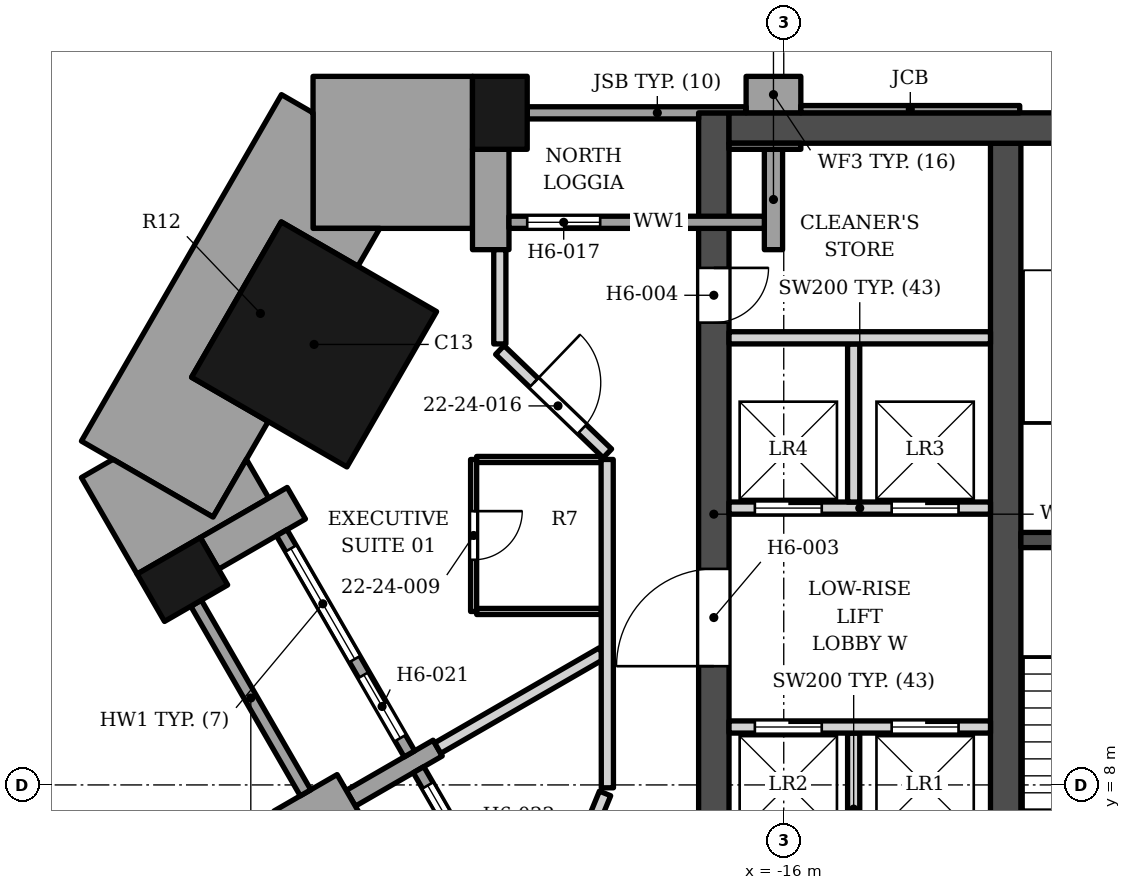
"""IFC4 building model, lengths in metres.
Left out: names, types, materials, properties, quantities, classifications, styles, units other than length and angle.
Written with IfcOpenShell. Run it as: python <this file> out.ifc"""

import sys

from ifc_helpers import new_model, si_unit, direction, frame, frame_2d, origin, origin_2d, place, context, subcontext, project, spatial, polyline, rectangle, outline, extrude, element, fill, save


model = new_model("IFC4")
c1 = context("Model", 3, precision=1e-05, world=origin(), true_north=direction((0.0, 1.0)))
c2 = subcontext(c1, "Body", "Model", "MODEL_VIEW")
j1 = project(units=[si_unit("LENGTHUNIT", "METRE"), si_unit("PLANEANGLEUNIT", "RADIAN")], contexts=[c1])
p1 = place(None, origin())
s1 = spatial("IfcSite", under=j1, at=p1, CompositionType="ELEMENT")
p2 = place(p1, origin())
s2 = spatial("IfcBuilding", under=s1, at=p2, CompositionType="ELEMENT")
p3 = place(p2, frame((0.0, 0.0, 102.0)))
s3 = spatial("IfcBuildingStorey", under=s2, at=p3, CompositionType="ELEMENT", Elevation=102.0)
p4 = place(p3, frame((-16.9, 18.802, 0.0), z_axis=(0.0, 0.0, 1.0), x_axis=(1.0, 0.0, 0.0)))
e1 = element("IfcWall", 1, at=p4, inside=s3, PredefinedType="SHEAR", context=c2, shape_type="SweptSolid", body=[
    extrude(rectangle(XDim=33.8, YDim=0.5, at=frame_2d((16.9, 0.0))), origin(), (0.0, 0.0, 1.0), 3.4),
])
p5 = place(p3, frame((-12.35, 5.253, 0.0), z_axis=(0.0, 0.0, 1.0), x_axis=(0.0, 1.0, 0.0)))
e2 = element("IfcWall", 2, at=p5, inside=s3, PredefinedType="SHEAR", context=c2, shape_type="SweptSolid", body=[
    extrude(rectangle(XDim=13.3, YDim=0.5, at=frame_2d((6.65, 0.0))), origin(), (0.0, 0.0, 1.0), 3.4),
])
p6 = place(p3, frame((-12.1, 12.028, 0.0), z_axis=(0.0, 0.0, 1.0), x_axis=(1.0, 0.0, 0.0)))
e3 = element("IfcWall", 3, at=p6, inside=s3, PredefinedType="SHEAR", context=c2, shape_type="SweptSolid", body=[
    extrude(rectangle(XDim=3.75, YDim=0.25, at=frame_2d((1.875, 0.0))), origin(), (0.0, 0.0, 1.0), 3.4),
])
p7 = place(p3, frame((-17.15, 5.853, 0.0), z_axis=(0.0, 0.0, 1.0), x_axis=(0.0, 1.0, 0.0)))
e4 = element("IfcWall", 4, at=p7, inside=s3, PredefinedType="SHEAR", context=c2, shape_type="SweptSolid", body=[
    extrude(rectangle(XDim=13.2, YDim=0.5, at=frame_2d((6.6, 0.0))), origin(), (0.0, 0.0, 1.0), 3.4),
])
p8 = place(p7, frame((4.1, 0.0, 0.0)))
e5 = element("IfcOpeningElement", 5, at=p8, cuts=e4, PredefinedType="OPENING", context=c2, shape_type="SweptSolid", body=[
    extrude(rectangle(XDim=1.6, YDim=2.1, at=frame_2d((0.8, 1.05))), frame((0.0, 0.26, 0.0), z_axis=(0.0, -1.0, 0.0), x_axis=(1.0, 0.0, 0.0)), (0.0, 0.0, 1.0), 0.52),
])
p9 = place(p7, frame((9.75, 0.0, 0.0)))
e6 = element("IfcOpeningElement", 6, at=p9, cuts=e4, PredefinedType="OPENING", context=c2, shape_type="SweptSolid", body=[
    extrude(rectangle(XDim=0.9, YDim=2.1, at=frame_2d((0.45, 1.05))), frame((0.0, 0.26, 0.0), z_axis=(0.0, -1.0, 0.0), x_axis=(1.0, 0.0, 0.0)), (0.0, 0.0, 1.0), 0.52),
])
p10 = place(p3, frame((-23.724, 15.244, 0.0), z_axis=(0.0, 0.0, 1.0), x_axis=(0.866025403784, -0.5, 0.0)))
e7 = element("IfcColumn", 7, at=p10, inside=s3, PredefinedType="COLUMN", context=c2, shape_type="SweptSolid", body=[
    extrude(rectangle(XDim=2.95, YDim=2.95, at=origin_2d()), origin(), (0.0, 0.0, 1.0), 3.4),
])
for number, where, z_axis, x_axis in (
    (8, (-25.89, 11.378, 0.0), (0.0, 0.0, 1.0), (0.5, -0.866, 0.0)),
    (9, (-20.669, 19.053, 0.0), (0.0, 0.0, 1.0), (-1.0, 0.0, 0.0)),
):
    element("IfcColumn", number, at=place(p3, frame(where, z_axis=z_axis, x_axis=x_axis)), inside=s3, PredefinedType="COLUMN", context=c2, shape_type="SweptSolid", body=[
        extrude(rectangle(XDim=0.9, YDim=1.2, at=origin_2d()), origin(), (0.0, 0.0, 1.0), 3.4),
    ])
p11 = place(p3, frame((-25.445, 11.808, 0.0), z_axis=(0.0, 0.0, 1.0), x_axis=(0.866040211805, 0.499974350878, 0.0)))
e10 = element("IfcWall", 10, at=p11, inside=s3, PredefinedType="SOLIDWALL", context=c2, shape_type="SweptSolid", body=[
    extrude(rectangle(XDim=1.65, YDim=0.6, at=frame_2d((0.825, 0.0))), origin(), (0.0, 0.0, 1.0), 2.63),
])
p12 = place(p3, frame((-24.159, 7.181, 0.0), z_axis=(0.0, 0.0, 1.0), x_axis=(0.866043267704, 0.499969057507, 0.0)))
e11 = element("IfcWall", 11, at=p12, inside=s3, PredefinedType="SOLIDWALL", context=c2, shape_type="SweptSolid", body=[
    extrude(rectangle(XDim=1.2, YDim=0.9, at=frame_2d((0.6, 0.0))), origin(), (0.0, 0.0, 1.0), 2.63),
])
p13 = place(p3, frame((-23.12, 7.781, 0.0), z_axis=(0.0, 0.0, 1.0), x_axis=(0.865976140824, 0.500085316245, 0.0)))
e12 = element("IfcWall", 12, at=p13, inside=s3, PredefinedType="SOLIDWALL", context=c2, shape_type="SweptSolid", body=[
    extrude(rectangle(XDim=1.65, YDim=0.3, at=frame_2d((0.825, 0.0))), origin(), (0.0, 0.0, 1.0), 2.65),
])
p14 = place(p3, frame((-25.665, 10.988, 0.0), z_axis=(0.0, 0.0, 1.0), x_axis=(0.499961193289, -0.866047807691, 0.0)))
e13 = element("IfcWall", 13, at=p14, inside=s3, PredefinedType="SOLIDWALL", context=c2, shape_type="SweptSolid", body=[
    extrude(rectangle(XDim=3.6, YDim=0.2, at=frame_2d((1.8, 0.0))), origin(), (0.0, 0.0, 1.0), 2.63),
])
p15 = place(p3, frame((-24.256, 12.148, 0.0), z_axis=(0.0, 0.0, 1.0), x_axis=(0.500027713859, -0.866009402589, 0.0)))
e14 = element("IfcWall", 14, at=p15, inside=s3, PredefinedType="ELEMENTEDWALL", context=c2, shape_type="SweptSolid", body=[
    extrude(rectangle(XDim=4.2, YDim=0.2, at=frame_2d((2.1, 0.0))), origin(), (0.0, 0.0, 1.0), 2.65),
])
p16 = place(p15, frame((0.3, 0.0, 0.6)))
e15 = element("IfcOpeningElement", 15, at=p16, cuts=e14, PredefinedType="OPENING", context=c2, shape_type="SweptSolid", body=[
    extrude(rectangle(XDim=2.1, YDim=1.8, at=frame_2d((1.05, 0.9))), frame((0.0, 0.11, 0.0), z_axis=(0.0, -1.0, 0.0), x_axis=(1.0, 0.0, 0.0)), (0.0, 0.0, 1.0), 0.22),
])
p17 = place(p15, frame((2.7, 0.0, 0.0)))
e16 = element("IfcOpeningElement", 16, at=p17, cuts=e14, PredefinedType="OPENING", context=c2, shape_type="SweptSolid", body=[
    extrude(rectangle(XDim=1.2, YDim=2.4, at=frame_2d((0.6, 1.2))), frame((0.0, 0.11, 0.0), z_axis=(0.0, -1.0, 0.0), x_axis=(1.0, 0.0, 0.0)), (0.0, 0.0, 1.0), 0.22),
])
p18 = place(p3, frame((-22.006, 8.251, 0.0), z_axis=(0.0, 0.0, 1.0), x_axis=(0.500002543286, -0.866023935413, 0.0)))
e17 = element("IfcWall", 17, at=p18, inside=s3, PredefinedType="ELEMENTEDWALL", context=c2, shape_type="SweptSolid", body=[
    extrude(rectangle(XDim=4.2, YDim=0.2, at=frame_2d((2.1, 0.0))), origin(), (0.0, 0.0, 1.0), 2.65),
])
p19 = place(p18, frame((0.3, 0.0, 0.6)))
e18 = element("IfcOpeningElement", 18, at=p19, cuts=e17, PredefinedType="OPENING", context=c2, shape_type="SweptSolid", body=[
    extrude(rectangle(XDim=2.1, YDim=1.8, at=frame_2d((1.05, 0.9))), frame((0.0, 0.11, 0.0), z_axis=(0.0, -1.0, 0.0), x_axis=(1.0, 0.0, 0.0)), (0.0, 0.0, 1.0), 0.22),
])
p20 = place(p18, frame((2.7, 0.0, 0.0)))
e19 = element("IfcOpeningElement", 19, at=p20, cuts=e17, PredefinedType="OPENING", context=c2, shape_type="SweptSolid", body=[
    extrude(rectangle(XDim=1.2, YDim=2.4, at=frame_2d((0.6, 1.2))), frame((0.0, 0.11, 0.0), z_axis=(0.0, -1.0, 0.0), x_axis=(1.0, 0.0, 0.0)), (0.0, 0.0, 1.0), 0.22),
])
p21 = place(p3, origin())
e20 = element("IfcWall", 20, at=p21, inside=s3, PredefinedType="SOLIDWALL", context=c2, shape_type="SweptSolid", body=[
    extrude(outline(polyline([(-15.719, 19.052), (-15.719, 19.653), (-16.619, 19.653), (-16.619, 19.052), (-15.719, 19.052)])), origin(), (0.0, 0.0, 1.0), 2.65),
])
p22 = place(p3, origin())
e21 = element("IfcWall", 21, at=p22, inside=s3, PredefinedType="SOLIDWALL", context=c2, shape_type="SweptSolid", body=[
    extrude(outline(polyline([(-16.902, 18.453), (-16.902, 18.552), (-15.719, 18.552), (-15.719, 18.453), (-16.902, 18.453)])), origin(), (0.0, 0.0, 1.0), 2.65),
])
p23 = place(p3, origin())
e22 = element("IfcWall", 22, at=p23, inside=s3, PredefinedType="SOLIDWALL", context=c2, shape_type="SweptSolid", body=[
    extrude(outline(polyline([(-16.019, 16.802), (-16.019, 18.453), (-16.319, 18.453), (-16.319, 16.802), (-16.019, 16.802)])), origin(), (0.0, 0.0, 1.0), 2.65),
])
p24 = place(p3, origin())
e23 = element("IfcWall", 23, at=p24, inside=s3, PredefinedType="SOLIDWALL", context=c2, shape_type="SweptSolid", body=[
    extrude(outline(polyline([(-21.119, 18.453), (-21.119, 16.802), (-20.519, 16.802), (-20.519, 18.453), (-21.119, 18.453)])), origin(), (0.0, 0.0, 1.0), 2.63),
])
p25 = place(p3, origin())
e24 = element("IfcWall", 24, at=p25, inside=s3, PredefinedType="SOLIDWALL", context=c2, shape_type="SweptSolid", body=[
    extrude(outline(polyline([(-15.719, 19.173), (-15.719, 19.052), (-12.119, 19.052), (-12.119, 19.173), (-15.719, 19.173)])), origin(), (0.0, 0.0, 1.0), 2.65),
])
p26 = place(p3, origin())
e25 = element("IfcWall", 25, at=p26, inside=s3, PredefinedType="SOLIDWALL", context=c2, shape_type="SweptSolid", body=[
    extrude(outline(polyline([(-16.619, 19.052), (-16.619, 19.153), (-20.219, 19.153), (-20.219, 18.953), (-17.4, 18.953), (-17.4, 19.052), (-16.619, 19.052)])), origin(), (0.0, 0.0, 1.0), 2.65),
])
p27 = place(p3, frame((-16.319, 17.252, 0.0), z_axis=(0.0, 0.0, 1.0), x_axis=(-1.0, 0.0, 0.0)))
e26 = element("IfcWall", 26, at=p27, inside=s3, PredefinedType="ELEMENTEDWALL", context=c2, shape_type="SweptSolid", body=[
    extrude(rectangle(XDim=4.2, YDim=0.2, at=frame_2d((2.1, 0.0))), origin(), (0.0, 0.0, 1.0), 2.65),
])
p28 = place(p27, frame((2.7, 0.0, 0.0)))
e27 = element("IfcOpeningElement", 27, at=p28, cuts=e26, PredefinedType="OPENING", context=c2, shape_type="SweptSolid", body=[
    extrude(rectangle(XDim=1.2, YDim=2.4, at=frame_2d((0.6, 1.2))), frame((0.0, 0.11, 0.0), z_axis=(0.0, -1.0, 0.0), x_axis=(1.0, 0.0, 0.0)), (0.0, 0.0, 1.0), 0.22),
])
p29 = place(p3, origin())
e28 = element("IfcWall", 28, at=p29, inside=s3, PredefinedType="SOLIDWALL", context=c2, shape_type="SweptSolid", body=[
    extrude(outline(polyline([(-23.741, 17.153), (-21.119, 17.153), (-21.119, 19.653), (-23.741, 19.653), (-23.741, 17.153)])), origin(), (0.0, 0.0, 1.0), 2.63),
])
p30 = place(p3, origin())
e29 = element("IfcWall", 29, at=p30, inside=s3, PredefinedType="SOLIDWALL", context=c2, shape_type="SweptSolid", body=[
    extrude(outline(polyline([(-23.003, 16.531), (-22.645, 17.153), (-23.741, 17.153), (-23.741, 19.052), (-24.261, 19.353), (-27.551, 13.655), (-25.386, 12.405), (-24.478, 13.976), (-25.739, 14.704), (-24.264, 17.259), (-23.003, 16.531)])), origin(), (0.0, 0.0, 1.0), 2.63),
])
p31 = place(p3, origin())
e30 = element("IfcWall", 30, at=p31, inside=s3, PredefinedType="SOLIDWALL", context=c2, shape_type="SweptSolid", body=[
    extrude(outline(polyline([(-24.837, 13.354), (-25.386, 12.405), (-27.031, 13.354), (-27.551, 13.054), (-26.635, 11.468), (-24.469, 12.718), (-24.837, 13.354)])), origin(), (0.0, 0.0, 1.0), 2.63),
])
p32 = place(p3, frame((-14.85, 6.353, 0.0), z_axis=(0.0, 0.0, 1.0), x_axis=(0.0, 1.0, 0.0)))
e31 = element("IfcWall", 31, at=p32, inside=s3, PredefinedType="SOLIDWALL", context=c2, shape_type="SweptSolid", body=[
    extrude(rectangle(XDim=2.5, YDim=0.2, at=frame_2d((1.25, 0.0))), origin(), (0.0, 0.0, 1.0), 3.23),
])
p33 = place(p3, frame((-16.9, 8.953, 0.0), z_axis=(0.0, 0.0, 1.0), x_axis=(1.0, 0.0, 0.0)))
e32 = element("IfcWall", 32, at=p33, inside=s3, PredefinedType="SOLIDWALL", context=c2, shape_type="SweptSolid", body=[
    extrude(rectangle(XDim=4.3, YDim=0.2, at=frame_2d((2.15, 0.0))), origin(), (0.0, 0.0, 1.0), 3.23),
])
p34 = place(p33, frame((2.675, 0.0, 0.0)))
e33 = element("IfcOpeningElement", 33, at=p34, cuts=e32, PredefinedType="OPENING", context=c2, shape_type="SweptSolid", body=[
    extrude(rectangle(XDim=1.1, YDim=2.1, at=frame_2d((0.55, 1.05))), frame((0.0, 0.11, 0.0), z_axis=(0.0, -1.0, 0.0), x_axis=(1.0, 0.0, 0.0)), (0.0, 0.0, 1.0), 0.22),
])
p35 = place(p33, frame((0.425, 0.0, 0.0)))
e34 = element("IfcOpeningElement", 34, at=p35, cuts=e32, PredefinedType="OPENING", context=c2, shape_type="SweptSolid", body=[
    extrude(rectangle(XDim=1.1, YDim=2.1, at=frame_2d((0.55, 1.05))), frame((0.0, 0.11, 0.0), z_axis=(0.0, -1.0, 0.0), x_axis=(1.0, 0.0, 0.0)), (0.0, 0.0, 1.0), 0.22),
])
p36 = place(p3, frame((-16.9, 12.552, 0.0), z_axis=(0.0, 0.0, 1.0), x_axis=(1.0, 0.0, 0.0)))
e35 = element("IfcWall", 35, at=p36, inside=s3, PredefinedType="SOLIDWALL", context=c2, shape_type="SweptSolid", body=[
    extrude(rectangle(XDim=4.3, YDim=0.2, at=frame_2d((2.15, 0.0))), origin(), (0.0, 0.0, 1.0), 3.23),
])
p37 = place(p36, frame((2.675, 0.0, 0.0)))
e36 = element("IfcOpeningElement", 36, at=p37, cuts=e35, PredefinedType="OPENING", context=c2, shape_type="SweptSolid", body=[
    extrude(rectangle(XDim=1.1, YDim=2.1, at=frame_2d((0.55, 1.05))), frame((0.0, 0.11, 0.0), z_axis=(0.0, -1.0, 0.0), x_axis=(1.0, 0.0, 0.0)), (0.0, 0.0, 1.0), 0.22),
])
p38 = place(p36, frame((0.425, 0.0, 0.0)))
e37 = element("IfcOpeningElement", 37, at=p38, cuts=e35, PredefinedType="OPENING", context=c2, shape_type="SweptSolid", body=[
    extrude(rectangle(XDim=1.1, YDim=2.1, at=frame_2d((0.55, 1.05))), frame((0.0, 0.11, 0.0), z_axis=(0.0, -1.0, 0.0), x_axis=(1.0, 0.0, 0.0)), (0.0, 0.0, 1.0), 0.22),
])
p39 = place(p3, frame((-14.85, 12.653, 0.0), z_axis=(0.0, 0.0, 1.0), x_axis=(0.0, 1.0, 0.0)))
e38 = element("IfcWall", 38, at=p39, inside=s3, PredefinedType="SOLIDWALL", context=c2, shape_type="SweptSolid", body=[
    extrude(rectangle(XDim=2.6, YDim=0.2, at=frame_2d((1.3, 0.0))), origin(), (0.0, 0.0, 1.0), 3.23),
])
p40 = place(p3, frame((-16.9, 15.353, 0.0), z_axis=(0.0, 0.0, 1.0), x_axis=(1.0, 0.0, 0.0)))
e39 = element("IfcWall", 39, at=p40, inside=s3, PredefinedType="SOLIDWALL", context=c2, shape_type="SweptSolid", body=[
    extrude(rectangle(XDim=4.3, YDim=0.2, at=frame_2d((2.15, 0.0))), origin(), (0.0, 0.0, 1.0), 3.23),
])
p41 = place(p3, frame((-19.459, 6.596, 0.0), z_axis=(0.0, 0.0, 1.0), x_axis=(0.380552104402, 0.924759479992, 0.0)))
e40 = element("IfcWall", 40, at=p41, inside=s3, PredefinedType="PARTITIONING", context=c2, shape_type="SweptSolid", body=[
    extrude(rectangle(XDim=1.366, YDim=0.2, at=frame_2d((0.683, 0.0))), origin(), (0.0, 0.0, 1.0), 3.23),
])
p42 = place(p3, frame((-21.691, 8.606, 0.0), z_axis=(0.0, 0.0, 1.0), x_axis=(0.866035862278, 0.499981884921, 0.0)))
e41 = element("IfcWall", 41, at=p42, inside=s3, PredefinedType="PARTITIONING", context=c2, shape_type="SweptSolid", body=[
    extrude(rectangle(XDim=3.123, YDim=0.2, at=frame_2d((1.561, 0.0))), origin(), (0.0, 0.0, 1.0), 3.23),
])
p43 = place(p3, frame((-21.051, 10.852, 0.0), z_axis=(0.0, 0.0, 1.0), x_axis=(0.99999965253, 0.000833630769, 0.0)))
e42 = element("IfcWall", 42, at=p43, inside=s3, PredefinedType="PARTITIONING", context=c2, shape_type="SweptSolid", body=[
    extrude(rectangle(XDim=2.05, YDim=0.1, at=frame_2d((1.025, 0.0))), origin(), (0.0, 0.0, 1.0), 3.23),
])
p44 = place(p3, frame((-21.101, 10.852, 0.0), z_axis=(0.0, 0.0, 1.0), x_axis=(0.0, 1.0, 0.0)))
e43 = element("IfcWall", 43, at=p44, inside=s3, PredefinedType="PARTITIONING", context=c2, shape_type="SweptSolid", body=[
    extrude(rectangle(XDim=2.5, YDim=0.1, at=frame_2d((1.25, 0.0))), origin(), (0.0, 0.0, 1.0), 3.23),
])
p45 = place(p44, frame((0.85, 0.0, 0.0)))
e44 = element("IfcOpeningElement", 44, at=p45, cuts=e43, PredefinedType="OPENING", context=c2, shape_type="SweptSolid", body=[
    extrude(rectangle(XDim=0.8, YDim=2.1, at=frame_2d((0.4, 1.05))), frame((0.0, 0.06, 0.0), z_axis=(0.0, -1.0, 0.0), x_axis=(1.0, 0.0, 0.0)), (0.0, 0.0, 1.0), 0.12),
])
p46 = place(p3, frame((-21.051, 13.352, 0.0), z_axis=(0.0, 0.0, 1.0), x_axis=(0.99999965253, -0.000833630769, 0.0)))
e45 = element("IfcWall", 45, at=p46, inside=s3, PredefinedType="PARTITIONING", context=c2, shape_type="SweptSolid", body=[
    extrude(rectangle(XDim=2.05, YDim=0.1, at=frame_2d((1.025, 0.0))), origin(), (0.0, 0.0, 1.0), 3.23),
])
p47 = place(p3, frame((-18.904, 13.352, 0.0), z_axis=(0.0, 0.0, 1.0), x_axis=(0.000678211175, -0.999999770015, 0.0)))
e46 = element("IfcWall", 46, at=p47, inside=s3, PredefinedType="PARTITIONING", context=c2, shape_type="SweptSolid", body=[
    extrude(rectangle(XDim=5.4, YDim=0.2, at=frame_2d((2.7, 0.0))), origin(), (0.0, 0.0, 1.0), 3.23),
])
p48 = place(p3, frame((-20.669, 15.152, 0.0), z_axis=(0.0, 0.0, 1.0), x_axis=(0.721047194307, -0.692885952796, 0.0)))
e47 = element("IfcWall", 47, at=p48, inside=s3, PredefinedType="PARTITIONING", context=c2, shape_type="SweptSolid", body=[
    extrude(rectangle(XDim=2.453, YDim=0.2, at=frame_2d((1.227, 0.0))), origin(), (0.0, 0.0, 1.0), 3.23),
])
p49 = place(p48, frame((0.777, 0.0, 0.0)))
e48 = element("IfcOpeningElement", 48, at=p49, cuts=e47, PredefinedType="OPENING", context=c2, shape_type="SweptSolid", body=[
    extrude(rectangle(XDim=1.1, YDim=2.1, at=frame_2d((0.55, 1.05))), frame((0.0, 0.11, 0.0), z_axis=(0.0, -1.0, 0.0), x_axis=(1.0, 0.0, 0.0)), (0.0, 0.0, 1.0), 0.22),
])
p50 = place(p3, frame((-20.669, 16.802, 0.0), z_axis=(0.0, 0.0, 1.0), x_axis=(0.0, -1.0, 0.0)))
e49 = element("IfcWall", 49, at=p50, inside=s3, PredefinedType="PARTITIONING", context=c2, shape_type="SweptSolid", body=[
    extrude(rectangle(XDim=1.55, YDim=0.2, at=frame_2d((0.775, 0.0))), origin(), (0.0, 0.0, 1.0), 3.23),
])
p51 = place(p16, origin())
e50 = element("IfcWindow", 50, at=p51, inside=s3, PartitioningType="SINGLE_PANEL", PredefinedType="WINDOW", context=c2, shape_type="SweptSolid", body=[
    extrude(rectangle(XDim=2.1, YDim=1.8, at=frame_2d((1.05, 0.9))), frame((0.0, 0.03, 0.0), z_axis=(0.0, -1.0, 0.0), x_axis=(1.0, 0.0, 0.0)), (0.0, 0.0, 1.0), 0.06),
])
fill(e15, e50)
p52 = place(p17, origin())
e51 = element("IfcDoor", 51, at=p52, inside=s3, OperationType="SINGLE_SWING_LEFT", PredefinedType="DOOR", context=c2, shape_type="SweptSolid", body=[
    extrude(rectangle(XDim=1.2, YDim=2.4, at=frame_2d((0.6, 1.2))), frame((0.0, 0.025, 0.0), z_axis=(0.0, -1.0, 0.0), x_axis=(1.0, 0.0, 0.0)), (0.0, 0.0, 1.0), 0.05),
])
fill(e16, e51)
p53 = place(p19, origin())
e52 = element("IfcWindow", 52, at=p53, inside=s3, PartitioningType="SINGLE_PANEL", PredefinedType="WINDOW", context=c2, shape_type="SweptSolid", body=[
    extrude(rectangle(XDim=2.1, YDim=1.8, at=frame_2d((1.05, 0.9))), frame((0.0, 0.03, 0.0), z_axis=(0.0, -1.0, 0.0), x_axis=(1.0, 0.0, 0.0)), (0.0, 0.0, 1.0), 0.06),
])
fill(e18, e52)
p54 = place(p28, origin())
e53 = element("IfcDoor", 53, at=p54, inside=s3, OperationType="SINGLE_SWING_LEFT", PredefinedType="DOOR", context=c2, shape_type="SweptSolid", body=[
    extrude(rectangle(XDim=1.2, YDim=2.4, at=frame_2d((0.6, 1.2))), frame((0.0, 0.025, 0.0), z_axis=(0.0, -1.0, 0.0), x_axis=(1.0, 0.0, 0.0)), (0.0, 0.0, 1.0), 0.05),
])
fill(e27, e53)
p55 = place(p34, origin())
e54 = element("IfcDoor", 54, at=p55, inside=s3, OperationType="DOUBLE_DOOR_SLIDING", PredefinedType="DOOR", context=c2, shape_type="SweptSolid", body=[
    extrude(rectangle(XDim=1.1, YDim=2.1, at=frame_2d((0.55, 1.05))), frame((0.0, 0.025, 0.0), z_axis=(0.0, -1.0, 0.0), x_axis=(1.0, 0.0, 0.0)), (0.0, 0.0, 1.0), 0.05),
])
fill(e33, e54)
p56 = place(p37, origin())
e55 = element("IfcDoor", 55, at=p56, inside=s3, OperationType="DOUBLE_DOOR_SLIDING", PredefinedType="DOOR", context=c2, shape_type="SweptSolid", body=[
    extrude(rectangle(XDim=1.1, YDim=2.1, at=frame_2d((0.55, 1.05))), frame((0.0, 0.025, 0.0), z_axis=(0.0, -1.0, 0.0), x_axis=(1.0, 0.0, 0.0)), (0.0, 0.0, 1.0), 0.05),
])
fill(e36, e55)
p57 = place(p35, origin())
e56 = element("IfcDoor", 56, at=p57, inside=s3, OperationType="DOUBLE_DOOR_SLIDING", PredefinedType="DOOR", context=c2, shape_type="SweptSolid", body=[
    extrude(rectangle(XDim=1.1, YDim=2.1, at=frame_2d((0.55, 1.05))), frame((0.0, 0.025, 0.0), z_axis=(0.0, -1.0, 0.0), x_axis=(1.0, 0.0, 0.0)), (0.0, 0.0, 1.0), 0.05),
])
fill(e34, e56)
p58 = place(p38, origin())
e57 = element("IfcDoor", 57, at=p58, inside=s3, OperationType="DOUBLE_DOOR_SLIDING", PredefinedType="DOOR", context=c2, shape_type="SweptSolid", body=[
    extrude(rectangle(XDim=1.1, YDim=2.1, at=frame_2d((0.55, 1.05))), frame((0.0, 0.025, 0.0), z_axis=(0.0, -1.0, 0.0), x_axis=(1.0, 0.0, 0.0)), (0.0, 0.0, 1.0), 0.05),
])
fill(e37, e57)
p59 = place(p8, origin())
e58 = element("IfcDoor", 58, at=p59, inside=s3, OperationType="DOUBLE_DOOR_SINGLE_SWING", PredefinedType="DOOR", context=c2, shape_type="SweptSolid", body=[
    extrude(rectangle(XDim=1.6, YDim=2.1, at=frame_2d((0.8, 1.05))), frame((0.0, 0.025, 0.0), z_axis=(0.0, -1.0, 0.0), x_axis=(1.0, 0.0, 0.0)), (0.0, 0.0, 1.0), 0.05),
])
fill(e5, e58)
p60 = place(p9, origin())
e59 = element("IfcDoor", 59, at=p60, inside=s3, OperationType="SINGLE_SWING_RIGHT", PredefinedType="DOOR", context=c2, shape_type="SweptSolid", body=[
    extrude(rectangle(XDim=0.9, YDim=2.1, at=frame_2d((0.45, 1.05))), frame((0.0, 0.025, 0.0), z_axis=(0.0, -1.0, 0.0), x_axis=(1.0, 0.0, 0.0)), (0.0, 0.0, 1.0), 0.05),
])
fill(e6, e59)
p61 = place(p45, origin())
e60 = element("IfcDoor", 60, at=p61, inside=s3, OperationType="SINGLE_SWING_RIGHT", PredefinedType="DOOR", context=c2, shape_type="SweptSolid", body=[
    extrude(rectangle(XDim=0.8, YDim=2.1, at=frame_2d((0.4, 1.05))), frame((0.0, 0.025, 0.0), z_axis=(0.0, -1.0, 0.0), x_axis=(1.0, 0.0, 0.0)), (0.0, 0.0, 1.0), 0.05),
])
fill(e44, e60)
p62 = place(p49, origin())
e61 = element("IfcDoor", 61, at=p62, inside=s3, OperationType="SINGLE_SWING_LEFT", PredefinedType="DOOR", context=c2, shape_type="SweptSolid", body=[
    extrude(rectangle(XDim=1.1, YDim=2.1, at=frame_2d((0.55, 1.05))), frame((0.0, 0.025, 0.0), z_axis=(0.0, -1.0, 0.0), x_axis=(1.0, 0.0, 0.0)), (0.0, 0.0, 1.0), 0.05),
])
fill(e48, e61)
save(model, sys.argv[1])
